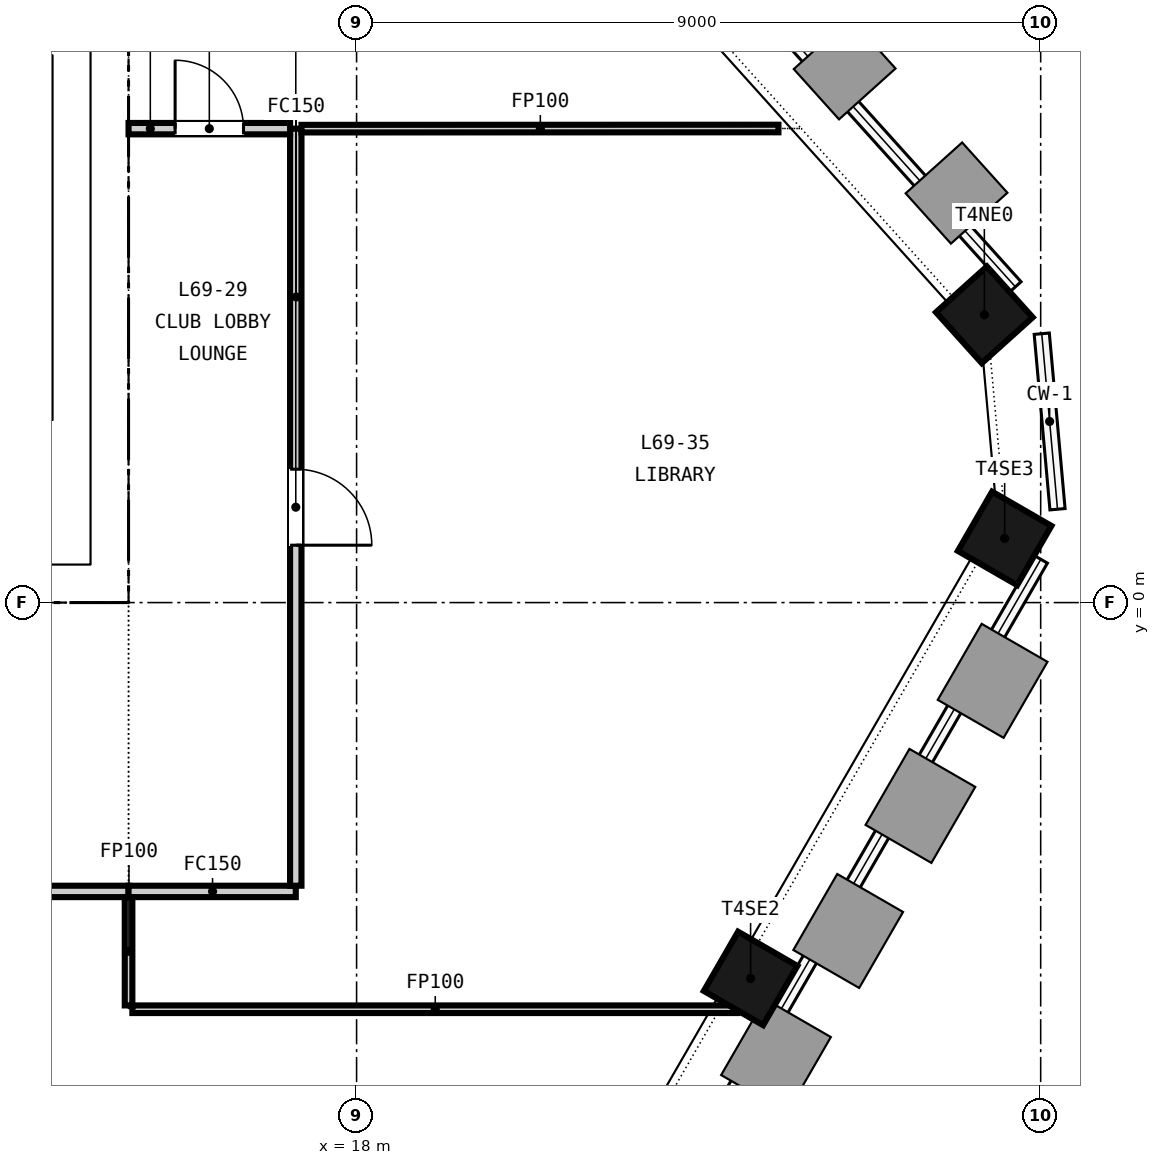
"""IFC4 building model, lengths in metres.
Left out: names, types, materials, properties, quantities, classifications, styles, units other than length and angle.
Written with IfcOpenShell. Run it as: python <this file> out.ifc"""

import sys

from ifc_helpers import new_model, si_unit, direction, frame, frame_2d, origin, origin_2d, place, context, subcontext, project, spatial, rectangle, extrude, element, fill, save


model = new_model("IFC4")
c1 = context("Model", 3, precision=1e-05, world=origin(), true_north=direction((0.0, 1.0)))
c2 = subcontext(c1, "Body", "Model", "MODEL_VIEW")
j1 = project(units=[si_unit("LENGTHUNIT", "METRE"), si_unit("PLANEANGLEUNIT", "RADIAN")], contexts=[c1])
p1 = place(None, origin())
s1 = spatial("IfcSite", under=j1, at=p1, CompositionType="ELEMENT")
p2 = place(p1, origin())
s2 = spatial("IfcBuilding", under=s1, at=p2, CompositionType="ELEMENT")
p3 = place(p2, frame((0.0, 0.0, 271.9)))
s3 = spatial("IfcBuildingStorey", under=s2, at=p3, CompositionType="ELEMENT", Elevation=271.9)
p4 = place(p3, frame((-15.0, 0.25, -0.15), z_axis=(0.0, 0.0, 1.0), x_axis=(1.0, 0.0, 0.0)))
e1 = element("IfcWall", 1, at=p4, inside=s3, PredefinedType="SOLIDWALL", context=c2, shape_type="SweptSolid", body=[
    extrude(rectangle(XDim=30.0, YDim=0.5, at=frame_2d((15.0, 0.0))), origin(), (0.0, 0.0, 1.0), 3.65),
])
p5 = place(p4, frame((5.8, 0.0, 0.15)))
e2 = element("IfcOpeningElement", 2, at=p5, cuts=e1, PredefinedType="OPENING", context=c2, shape_type="SweptSolid", body=[
    extrude(rectangle(XDim=2.4, YDim=2.4, at=frame_2d((1.2, 1.2))), frame((0.0, 0.26, 0.0), z_axis=(0.0, -1.0, 0.0), x_axis=(1.0, 0.0, 0.0)), (0.0, 0.0, 1.0), 0.52),
])
p6 = place(p4, frame((13.8, 0.0, 0.15)))
e3 = element("IfcOpeningElement", 3, at=p6, cuts=e1, PredefinedType="OPENING", context=c2, shape_type="SweptSolid", body=[
    extrude(rectangle(XDim=2.4, YDim=2.4, at=frame_2d((1.2, 1.2))), frame((0.0, 0.26, 0.0), z_axis=(0.0, -1.0, 0.0), x_axis=(1.0, 0.0, 0.0)), (0.0, 0.0, 1.0), 0.52),
])
p7 = place(p4, frame((21.8, 0.0, 0.15)))
e4 = element("IfcOpeningElement", 4, at=p7, cuts=e1, PredefinedType="OPENING", context=c2, shape_type="SweptSolid", body=[
    extrude(rectangle(XDim=2.4, YDim=2.4, at=frame_2d((1.2, 1.2))), frame((0.0, 0.26, 0.0), z_axis=(0.0, -1.0, 0.0), x_axis=(1.0, 0.0, 0.0)), (0.0, 0.0, 1.0), 0.52),
])
p8 = place(p4, frame((1.5, 0.0, 0.15)))
e5 = element("IfcOpeningElement", 5, at=p8, cuts=e1, PredefinedType="OPENING", context=c2, shape_type="SweptSolid", body=[
    extrude(rectangle(XDim=1.2, YDim=2.1, at=frame_2d((0.6, 1.05))), frame((0.0, 0.26, 0.0), z_axis=(0.0, -1.0, 0.0), x_axis=(1.0, 0.0, 0.0)), (0.0, 0.0, 1.0), 0.52),
])
p9 = place(p4, frame((27.3, 0.0, 0.15)))
e6 = element("IfcOpeningElement", 6, at=p9, cuts=e1, PredefinedType="OPENING", context=c2, shape_type="SweptSolid", body=[
    extrude(rectangle(XDim=1.2, YDim=2.1, at=frame_2d((0.6, 1.05))), frame((0.0, 0.26, 0.0), z_axis=(0.0, -1.0, 0.0), x_axis=(1.0, 0.0, 0.0)), (0.0, 0.0, 1.0), 0.52),
])
p10 = place(p3, frame((14.75, 0.5, -0.15), z_axis=(0.0, 0.0, 1.0), x_axis=(0.0, 1.0, 0.0)))
e7 = element("IfcWall", 7, at=p10, inside=s3, PredefinedType="SOLIDWALL", context=c2, shape_type="SweptSolid", body=[
    extrude(rectangle(XDim=14.0, YDim=0.5, at=frame_2d((7.0, 0.0))), origin(), (0.0, 0.0, 1.0), 3.65),
])
for number, where, z_axis, x_axis in (
    (8, (23.184, -4.945, -0.15), (0.0, 0.0, 1.0), (0.5, 0.866, 0.0)),
    (9, (26.526, 0.844, -0.15), (0.0, 0.0, 1.0), (0.5, 0.866, 0.0)),
    (10, (26.259, 3.786, -0.15), (0.0, 0.0, 1.0), (-0.669, 0.743, 0.0)),
):
    element("IfcColumn", number, at=place(p3, frame(where, z_axis=z_axis, x_axis=x_axis)), inside=s3, PredefinedType="COLUMN", context=c2, shape_type="SweptSolid", body=[
        extrude(rectangle(XDim=0.9, YDim=0.9, at=origin_2d()), origin(), (0.0, 0.0, 1.0), 3.65),
    ])
p11 = place(p3, frame((11.05, 7.35, 0.0), z_axis=(0.0, 0.0, 1.0), x_axis=(1.0, 0.0, 0.0)))
e11 = element("IfcWall", 11, at=p11, inside=s3, PredefinedType="SOLIDWALL", context=c2, shape_type="SweptSolid", body=[
    extrude(rectangle(XDim=2.95, YDim=0.3, at=frame_2d((1.475, 0.0))), origin(), (0.0, 0.0, 1.0), 3.5),
])
p12 = place(p3, frame((14.25, 0.5, 0.0), z_axis=(0.0, 0.0, 1.0), x_axis=(0.0, 1.0, 0.0)))
e12 = element("IfcWall", 12, at=p12, inside=s3, PredefinedType="SOLIDWALL", context=c2, shape_type="SweptSolid", body=[
    extrude(rectangle(XDim=14.0, YDim=0.5, at=frame_2d((7.0, 0.0))), origin(), (0.0, 0.0, 1.0), 3.5),
])
p13 = place(p3, frame((15.0, -3.8, 0.0), z_axis=(0.0, 0.0, 1.0), x_axis=(-1.0, 0.0, 0.0)))
e13 = element("IfcWall", 13, at=p13, inside=s3, PredefinedType="PARTITIONING", context=c2, shape_type="SweptSolid", body=[
    extrude(rectangle(XDim=11.615, YDim=0.15, at=frame_2d((5.808, 0.0))), origin(), (0.0, 0.0, 1.0), 2.751),
])
p14 = place(p13, frame((4.907, 0.0, 0.0)))
e14 = element("IfcOpeningElement", 14, at=p14, cuts=e13, PredefinedType="OPENING", context=c2, shape_type="SweptSolid", body=[
    extrude(rectangle(XDim=1.8, YDim=2.1, at=frame_2d((0.9, 1.05))), frame((0.0, 0.085, 0.0), z_axis=(0.0, -1.0, 0.0), x_axis=(1.0, 0.0, 0.0)), (0.0, 0.0, 1.0), 0.17),
])
p15 = place(p3, frame((17.2, -3.8, 0.0), z_axis=(0.0, 0.0, 1.0), x_axis=(-1.0, 0.0, 0.0)))
e15 = element("IfcWall", 15, at=p15, inside=s3, PredefinedType="PARTITIONING", context=c2, shape_type="SweptSolid", body=[
    extrude(rectangle(XDim=2.2, YDim=0.15, at=frame_2d((1.1, 0.0))), origin(), (0.0, 0.0, 1.0), 2.751),
])
p16 = place(p3, frame((17.2, 6.235, 0.0), z_axis=(0.0, 0.0, 1.0), x_axis=(0.0, -1.0, 0.0)))
e16 = element("IfcWall", 16, at=p16, inside=s3, PredefinedType="PARTITIONING", context=c2, shape_type="SweptSolid", body=[
    extrude(rectangle(XDim=9.96, YDim=0.15, at=frame_2d((4.98, 0.0))), origin(), (0.0, 0.0, 1.0), 2.751),
])
p17 = place(p16, frame((4.48, 0.0, 0.0)))
e17 = element("IfcOpeningElement", 17, at=p17, cuts=e16, PredefinedType="OPENING", context=c2, shape_type="SweptSolid", body=[
    extrude(rectangle(XDim=1.0, YDim=2.1, at=frame_2d((0.5, 1.05))), frame((0.0, 0.085, 0.0), z_axis=(0.0, -1.0, 0.0), x_axis=(1.0, 0.0, 0.0)), (0.0, 0.0, 1.0), 0.17),
])
p18 = place(p3, frame((15.0, 6.235, 0.0), z_axis=(0.0, 0.0, 1.0), x_axis=(1.0, 0.0, 0.0)))
e18 = element("IfcWall", 18, at=p18, inside=s3, PredefinedType="PARTITIONING", context=c2, shape_type="SweptSolid", body=[
    extrude(rectangle(XDim=2.125, YDim=0.15, at=frame_2d((1.062, 0.0))), origin(), (0.0, 0.0, 1.0), 2.751),
])
p19 = place(p18, frame((0.613, 0.0, 0.0)))
e19 = element("IfcOpeningElement", 19, at=p19, cuts=e18, PredefinedType="OPENING", context=c2, shape_type="SweptSolid", body=[
    extrude(rectangle(XDim=0.9, YDim=2.1, at=frame_2d((0.45, 1.05))), frame((0.0, 0.085, 0.0), z_axis=(0.0, -1.0, 0.0), x_axis=(1.0, 0.0, 0.0)), (0.0, 0.0, 1.0), 0.17),
])
p20 = place(p3, frame((17.275, 6.235, 0.0), z_axis=(0.0, 0.0, 1.0), x_axis=(0.999999962915, 0.00027234174, 0.0)))
e20 = element("IfcWall", 20, at=p20, inside=s3, PredefinedType="PARTITIONING", context=c2, shape_type="SweptSolid", body=[
    extrude(rectangle(XDim=6.275, YDim=0.1, at=frame_2d((3.138, 0.0))), origin(), (0.0, 0.0, 1.0), 2.751),
])
p21 = place(p3, frame((15.05, -5.35, 0.0), z_axis=(0.0, 0.0, 1.0), x_axis=(1.0, 0.0, 0.0)))
e21 = element("IfcWall", 21, at=p21, inside=s3, PredefinedType="PARTITIONING", context=c2, shape_type="SweptSolid", body=[
    extrude(rectangle(XDim=7.96, YDim=0.1, at=frame_2d((3.98, 0.0))), origin(), (0.0, 0.0, 1.0), 2.751),
])
p22 = place(p3, frame((15.0, -5.3, 0.0), z_axis=(0.0, 0.0, 1.0), x_axis=(0.0, 1.0, 0.0)))
e22 = element("IfcWall", 22, at=p22, inside=s3, PredefinedType="PARTITIONING", context=c2, shape_type="SweptSolid", body=[
    extrude(rectangle(XDim=1.425, YDim=0.1, at=frame_2d((0.712, 0.0))), origin(), (0.0, 0.0, 1.0), 2.751),
])
p23 = place(p19, origin())
e23 = element("IfcDoor", 23, at=p23, inside=s3, OperationType="SINGLE_SWING_LEFT", PredefinedType="DOOR", context=c2, shape_type="SweptSolid", body=[
    extrude(rectangle(XDim=0.9, YDim=2.1, at=frame_2d((0.45, 1.05))), frame((0.0, 0.025, 0.0), z_axis=(0.0, -1.0, 0.0), x_axis=(1.0, 0.0, 0.0)), (0.0, 0.0, 1.0), 0.05),
])
fill(e19, e23)
p24 = place(p17, origin())
e24 = element("IfcDoor", 24, at=p24, inside=s3, OperationType="SINGLE_SWING_RIGHT", PredefinedType="DOOR", context=c2, shape_type="SweptSolid", body=[
    extrude(rectangle(XDim=1.0, YDim=2.1, at=frame_2d((0.5, 1.05))), frame((0.0, 0.025, 0.0), z_axis=(0.0, -1.0, 0.0), x_axis=(1.0, 0.0, 0.0)), (0.0, 0.0, 1.0), 0.05),
])
fill(e17, e24)
save(model, sys.argv[1])
